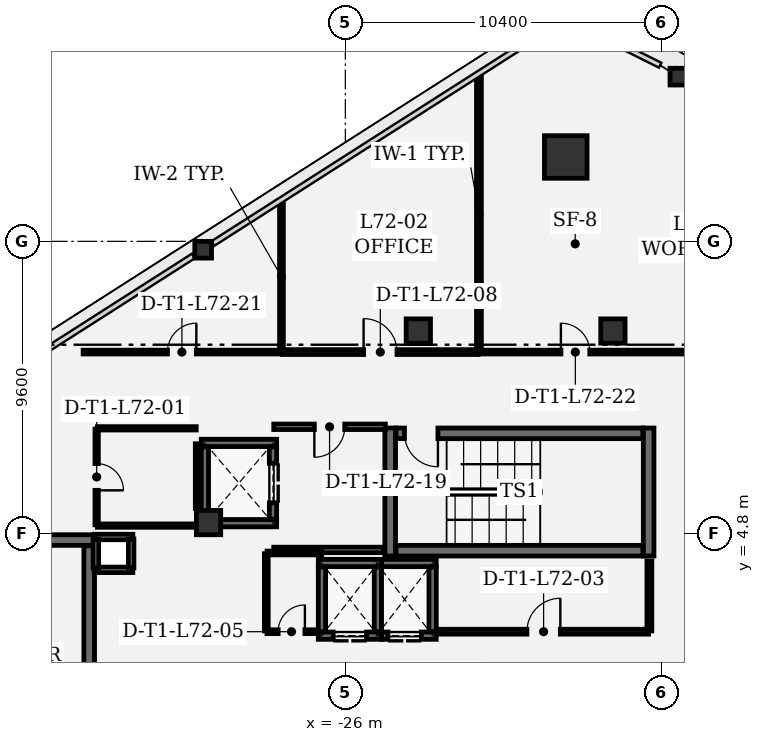
"""IFC4 building model, lengths in metres.
Left out: names, types, materials, properties, quantities, classifications, styles, units other than length and angle.
Written with IfcOpenShell. Run it as: python <this file> out.ifc"""

import sys

from ifc_helpers import new_model, si_unit, direction, frame, frame_2d, origin, origin_2d, place, context, subcontext, project, spatial, rectangle, extrude, element, fill, save


model = new_model("IFC4")
c1 = context("Model", 3, precision=1e-05, world=origin(), true_north=direction((0.0, 1.0)))
c2 = subcontext(c1, "Body", "Model", "MODEL_VIEW")
j1 = project(units=[si_unit("LENGTHUNIT", "METRE"), si_unit("PLANEANGLEUNIT", "RADIAN")], contexts=[c1])
p1 = place(None, origin())
s1 = spatial("IfcSite", under=j1, at=p1, CompositionType="ELEMENT")
p2 = place(p1, origin())
s2 = spatial("IfcBuilding", under=s1, at=p2, CompositionType="ELEMENT")
p3 = place(p2, frame((0.0, 0.0, 310.2)))
s3 = spatial("IfcBuildingStorey", under=s2, at=p3, CompositionType="ELEMENT", Elevation=310.2)
p4 = place(p3, frame((-18.75, 17.176, 0.0), z_axis=(0.0, 0.0, 1.0), x_axis=(1.0, 0.0, 0.0)))
e1 = element("IfcColumn", 1, at=p4, inside=s3, PredefinedType="COLUMN", context=c2, shape_type="SweptSolid", body=[
    extrude(rectangle(XDim=1.4, YDim=1.4, at=origin_2d()), origin(), (0.0, 0.0, 1.0), 4.2),
])
for number, where, z_axis, x_axis in (
    (2, (-23.6, 11.45, 0.0), (0.0, 0.0, 1.0), (1.0, 0.0, 0.0)),
    (3, (-17.2, 11.45, 0.0), (0.0, 0.0, 1.0), (1.0, 0.0, 0.0)),
    (4, (-30.5, 5.15, 0.0), (0.0, 0.0, 1.0), (1.0, 0.0, 0.0)),
):
    element("IfcColumn", number, at=place(p3, frame(where, z_axis=z_axis, x_axis=x_axis)), inside=s3, PredefinedType="COLUMN", context=c2, shape_type="SweptSolid", body=[
        extrude(rectangle(XDim=0.8, YDim=0.8, at=origin_2d()), origin(), (0.0, 0.0, 1.0), 4.2),
    ])
for number, where, z_axis, x_axis in (
    (5, (-30.677, 14.124, 0.0), (0.0, 0.0, 1.0), (1.0, 0.0, 0.0)),
    (6, (-15.046, 19.818, 0.0), (0.0, 0.0, 1.0), (1.0, 0.0, 0.0)),
):
    element("IfcColumn", number, at=place(p3, frame(where, z_axis=z_axis, x_axis=x_axis)), inside=s3, PredefinedType="COLUMN", context=c2, shape_type="SweptSolid", body=[
        extrude(rectangle(XDim=0.55, YDim=0.55, at=origin_2d()), origin(), (0.0, 0.0, 1.0), 4.2),
    ])
for number, where, z_axis, x_axis in (
    (7, (-24.525, 8.26, 0.0), (0.0, 0.0, 1.0), (0.0, -1.0, 0.0)),
    (8, (-16.025, 4.05, 0.0), (0.0, 0.0, 1.0), (0.0, 1.0, 0.0)),
):
    element("IfcWall", number, at=place(p3, frame(where, z_axis=z_axis, x_axis=x_axis)), inside=s3, PredefinedType="SHEAR", context=c2, shape_type="SweptSolid", body=[
        extrude(rectangle(XDim=4.21, YDim=0.35, at=frame_2d((2.105, 0.0))), origin(), (0.0, 0.0, 1.0), 3.91),
    ])
p5 = place(p3, frame((-24.335, 4.225, 0.0), z_axis=(0.0, 0.0, 1.0), x_axis=(1.0, 0.0, 0.0)))
e9 = element("IfcWall", 9, at=p5, inside=s3, PredefinedType="SHEAR", context=c2, shape_type="SweptSolid", body=[
    extrude(rectangle(XDim=8.12, YDim=0.35, at=frame_2d((4.06, 0.0))), origin(), (0.0, 0.0, 1.0), 3.91),
])
p6 = place(p3, frame((-16.215, 8.085, 0.0), z_axis=(0.0, 0.0, 1.0), x_axis=(-1.0, 0.0, 0.0)))
e10 = element("IfcWall", 10, at=p6, inside=s3, PredefinedType="SHEAR", context=c2, shape_type="SweptSolid", body=[
    extrude(rectangle(XDim=8.12, YDim=0.35, at=frame_2d((4.06, 0.0))), origin(), (0.0, 0.0, 1.0), 3.91),
])
p7 = place(p6, frame((6.74, 0.0, 0.0)))
e11 = element("IfcOpeningElement", 11, at=p7, cuts=e10, PredefinedType="OPENING", context=c2, shape_type="SweptSolid", body=[
    extrude(rectangle(XDim=1.1, YDim=2.2, at=frame_2d((0.55, 1.1))), frame((0.0, 0.185, 0.0), z_axis=(0.0, -1.0, 0.0), x_axis=(1.0, 0.0, 0.0)), (0.0, 0.0, 1.0), 0.37),
])
p8 = place(p3, frame((-34.25, 4.575, 0.0), z_axis=(0.0, 0.0, 1.0), x_axis=(-1.0, 0.0, 0.0)))
e12 = element("IfcWall", 12, at=p8, inside=s3, PredefinedType="SHEAR", context=c2, shape_type="SweptSolid", body=[
    extrude(rectangle(XDim=4.21, YDim=0.35, at=frame_2d((2.105, 0.0))), origin(), (0.0, 0.0, 1.0), 3.91),
])
p9 = place(p3, frame((-34.425, -4.385, 0.0), z_axis=(0.0, 0.0, 1.0), x_axis=(0.0, 1.0, 0.0)))
e13 = element("IfcWall", 13, at=p9, inside=s3, PredefinedType="SHEAR", context=c2, shape_type="SweptSolid", body=[
    extrude(rectangle(XDim=8.77, YDim=0.35, at=frame_2d((4.385, 0.0))), origin(), (0.0, 0.0, 1.0), 3.91),
])
for number, where, z_axis, x_axis in (
    (14, (-28.26, 5.13, 0.0), (0.0, 0.0, 1.0), (-1.0, 0.0, 0.0)),
    (15, (-30.74, 7.77, 0.0), (0.0, 0.0, 1.0), (1.0, 0.0, 0.0)),
):
    element("IfcWall", number, at=place(p3, frame(where, z_axis=z_axis, x_axis=x_axis)), inside=s3, PredefinedType="SHEAR", context=c2, shape_type="SweptSolid", body=[
        extrude(rectangle(XDim=2.48, YDim=0.24, at=frame_2d((1.24, 0.0))), origin(), (0.0, 0.0, 1.0), 3.91),
    ])
p10 = place(p3, frame((-30.62, 5.262, 0.0), z_axis=(0.0, 0.0, 1.0), x_axis=(0.0, 1.0, 0.0)))
e16 = element("IfcWall", 16, at=p10, inside=s3, PredefinedType="SHEAR", context=c2, shape_type="SweptSolid", body=[
    extrude(rectangle(XDim=2.376, YDim=0.24, at=frame_2d((1.188, 0.0))), origin(), (0.0, 0.0, 1.0), 3.91),
])
p11 = place(p3, frame((-28.38, 7.638, 0.0), z_axis=(0.0, 0.0, 1.0), x_axis=(0.0, -1.0, 0.0)))
e17 = element("IfcWall", 17, at=p11, inside=s3, PredefinedType="SHEAR", context=c2, shape_type="SweptSolid", body=[
    extrude(rectangle(XDim=2.376, YDim=0.24, at=frame_2d((1.188, 0.0))), origin(), (0.0, 0.0, 1.0), 3.91),
])
p12 = place(p11, frame((0.538, 0.0, 0.0)))
e18 = element("IfcOpeningElement", 18, at=p12, cuts=e17, PredefinedType="OPENING", context=c2, shape_type="SweptSolid", body=[
    extrude(rectangle(XDim=1.3, YDim=2.3, at=frame_2d((0.65, 1.15))), frame((0.0, 0.13, 0.0), z_axis=(0.0, -1.0, 0.0), x_axis=(1.0, 0.0, 0.0)), (0.0, 0.0, 1.0), 0.26),
])
p13 = place(p3, frame((-24.81, 1.43, 0.0), z_axis=(0.0, 0.0, 1.0), x_axis=(-1.0, 0.0, 0.0)))
e19 = element("IfcWall", 19, at=p13, inside=s3, PredefinedType="SHEAR", context=c2, shape_type="SweptSolid", body=[
    extrude(rectangle(XDim=2.08, YDim=0.24, at=frame_2d((1.04, 0.0))), origin(), (0.0, 0.0, 1.0), 3.91),
])
p14 = place(p13, frame((0.49, 0.0, 0.0)))
e20 = element("IfcOpeningElement", 20, at=p14, cuts=e19, PredefinedType="OPENING", context=c2, shape_type="SweptSolid", body=[
    extrude(rectangle(XDim=1.1, YDim=2.2, at=frame_2d((0.55, 1.1))), frame((0.0, 0.13, 0.0), z_axis=(0.0, -1.0, 0.0), x_axis=(1.0, 0.0, 0.0)), (0.0, 0.0, 1.0), 0.26),
])
p15 = place(p3, frame((-26.89, 3.82, 0.0), z_axis=(0.0, 0.0, 1.0), x_axis=(1.0, 0.0, 0.0)))
e21 = element("IfcWall", 21, at=p15, inside=s3, PredefinedType="SHEAR", context=c2, shape_type="SweptSolid", body=[
    extrude(rectangle(XDim=2.08, YDim=0.24, at=frame_2d((1.04, 0.0))), origin(), (0.0, 0.0, 1.0), 3.91),
])
for number, where, z_axis, x_axis in (
    (22, (-26.77, 1.562, 0.0), (0.0, 0.0, 1.0), (0.0, 1.0, 0.0)),
    (23, (-24.93, 3.688, 0.0), (0.0, 0.0, 1.0), (0.0, -1.0, 0.0)),
):
    element("IfcWall", number, at=place(p3, frame(where, z_axis=z_axis, x_axis=x_axis)), inside=s3, PredefinedType="SHEAR", context=c2, shape_type="SweptSolid", body=[
        extrude(rectangle(XDim=2.126, YDim=0.24, at=frame_2d((1.063, 0.0))), origin(), (0.0, 0.0, 1.0), 3.91),
    ])
p16 = place(p3, frame((-23.01, 1.43, 0.0), z_axis=(0.0, 0.0, 1.0), x_axis=(-1.0, 0.0, 0.0)))
e24 = element("IfcWall", 24, at=p16, inside=s3, PredefinedType="SHEAR", context=c2, shape_type="SweptSolid", body=[
    extrude(rectangle(XDim=1.8, YDim=0.24, at=frame_2d((0.9, 0.0))), origin(), (0.0, 0.0, 1.0), 3.91),
])
p17 = place(p16, frame((0.49, 0.0, 0.0)))
e25 = element("IfcOpeningElement", 25, at=p17, cuts=e24, PredefinedType="OPENING", context=c2, shape_type="SweptSolid", body=[
    extrude(rectangle(XDim=1.1, YDim=2.2, at=frame_2d((0.55, 1.1))), frame((0.0, 0.13, 0.0), z_axis=(0.0, -1.0, 0.0), x_axis=(1.0, 0.0, 0.0)), (0.0, 0.0, 1.0), 0.26),
])
p18 = place(p3, frame((-24.81, 3.82, 0.0), z_axis=(0.0, 0.0, 1.0), x_axis=(1.0, 0.0, 0.0)))
e26 = element("IfcWall", 26, at=p18, inside=s3, PredefinedType="SHEAR", context=c2, shape_type="SweptSolid", body=[
    extrude(rectangle(XDim=1.8, YDim=0.24, at=frame_2d((0.9, 0.0))), origin(), (0.0, 0.0, 1.0), 3.91),
])
p19 = place(p3, frame((-23.13, 3.688, 0.0), z_axis=(0.0, 0.0, 1.0), x_axis=(0.0, -1.0, 0.0)))
e27 = element("IfcWall", 27, at=p19, inside=s3, PredefinedType="SHEAR", context=c2, shape_type="SweptSolid", body=[
    extrude(rectangle(XDim=2.126, YDim=0.24, at=frame_2d((1.063, 0.0))), origin(), (0.0, 0.0, 1.0), 3.91),
])
for number, where, z_axis, x_axis in (
    (28, (-32.99, 3.595, 0.0), (0.0, 0.0, 1.0), (-1.0, 0.0, 0.0)),
    (29, (-34.26, 4.675, 0.0), (0.0, 0.0, 1.0), (1.0, 0.0, 0.0)),
):
    element("IfcWall", number, at=place(p3, frame(where, z_axis=z_axis, x_axis=x_axis)), inside=s3, PredefinedType="PARTITIONING", context=c2, shape_type="SweptSolid", body=[
        extrude(rectangle(XDim=1.27, YDim=0.18, at=frame_2d((0.635, 0.0))), origin(), (0.0, 0.0, 1.0), 3.91),
    ])
for number, where, z_axis, x_axis in (
    (30, (-34.205, 3.66, 0.0), (0.0, 0.0, 1.0), (0.0, 1.0, 0.0)),
    (31, (-33.045, 4.61, 0.0), (0.0, 0.0, 1.0), (0.0, -1.0, 0.0)),
):
    element("IfcWall", number, at=place(p3, frame(where, z_axis=z_axis, x_axis=x_axis)), inside=s3, PredefinedType="PARTITIONING", context=c2, shape_type="SweptSolid", body=[
        extrude(rectangle(XDim=0.95, YDim=0.18, at=frame_2d((0.475, 0.0))), origin(), (0.0, 0.0, 1.0), 3.91),
    ])
p20 = place(p3, frame((-28.355, 4.25, 0.0), z_axis=(0.0, 0.0, 1.0), x_axis=(1.0, 0.0, 0.0)))
e32 = element("IfcWall", 32, at=p20, inside=s3, PredefinedType="PARTITIONING", context=c2, shape_type="SweptSolid", body=[
    extrude(rectangle(XDim=3.622, YDim=0.18, at=frame_2d((1.811, 0.0))), origin(), (0.0, 0.0, 1.0), 3.91),
])
p21 = place(p3, frame((-24.684, 8.3, 0.0), z_axis=(0.0, 0.0, 1.0), x_axis=(-1.0, 0.0, 0.0)))
e33 = element("IfcWall", 33, at=p21, inside=s3, PredefinedType="PARTITIONING", context=c2, shape_type="SweptSolid", body=[
    extrude(rectangle(XDim=3.671, YDim=0.18, at=frame_2d((1.835, 0.0))), origin(), (0.0, 0.0, 1.0), 3.529),
])
p22 = place(p21, frame((1.335, 0.0, 0.0)))
e34 = element("IfcOpeningElement", 34, at=p22, cuts=e33, PredefinedType="OPENING", context=c2, shape_type="SweptSolid", body=[
    extrude(rectangle(XDim=1.0, YDim=2.15, at=frame_2d((0.5, 1.075))), frame((0.0, 0.1, 0.0), z_axis=(0.0, -1.0, 0.0), x_axis=(1.0, 0.0, 0.0)), (0.0, 0.0, 1.0), 0.2),
])
p23 = place(p3, frame((-34.18, 8.225, 0.0), z_axis=(0.0, 0.0, 1.0), x_axis=(0.0, -1.0, 0.0)))
e35 = element("IfcWall", 35, at=p23, inside=s3, PredefinedType="PARTITIONING", context=c2, shape_type="SweptSolid", body=[
    extrude(rectangle(XDim=3.15, YDim=0.11, at=frame_2d((1.575, 0.0))), origin(), (0.0, 0.0, 1.0), 3.91),
])
p24 = place(p23, frame((1.135, 0.0, 0.0)))
e36 = element("IfcOpeningElement", 36, at=p24, cuts=e35, PredefinedType="OPENING", context=c2, shape_type="SweptSolid", body=[
    extrude(rectangle(XDim=0.88, YDim=2.1, at=frame_2d((0.44, 1.05))), frame((0.0, 0.065, 0.0), z_axis=(0.0, -1.0, 0.0), x_axis=(1.0, 0.0, 0.0)), (0.0, 0.0, 1.0), 0.13),
])
p25 = place(p3, frame((-34.155, 5.05, 0.0), z_axis=(0.0, 0.0, 1.0), x_axis=(1.0, 0.0, 0.0)))
e37 = element("IfcWall", 37, at=p25, inside=s3, PredefinedType="PARTITIONING", context=c2, shape_type="SweptSolid", body=[
    extrude(rectangle(XDim=3.19, YDim=0.11, at=frame_2d((1.595, 0.0))), origin(), (0.0, 0.0, 1.0), 3.91),
])
p26 = place(p3, frame((-30.88, 5.615, 0.0), z_axis=(0.0, 0.0, 1.0), x_axis=(0.0, 1.0, 0.0)))
e38 = element("IfcWall", 38, at=p26, inside=s3, PredefinedType="PARTITIONING", context=c2, shape_type="SweptSolid", body=[
    extrude(rectangle(XDim=2.128, YDim=0.11, at=frame_2d((1.064, 0.0))), origin(), (0.0, 0.0, 1.0), 3.91),
])
p27 = place(p3, frame((-30.905, 8.25, 0.0), z_axis=(0.0, 0.0, 1.0), x_axis=(-1.0, 0.0, 0.0)))
e39 = element("IfcWall", 39, at=p27, inside=s3, PredefinedType="PARTITIONING", context=c2, shape_type="SweptSolid", body=[
    extrude(rectangle(XDim=3.25, YDim=0.11, at=frame_2d((1.625, 0.0))), origin(), (0.0, 0.0, 1.0), 3.13),
])
p28 = place(p3, frame((-22.934, 1.56, 0.0), z_axis=(0.0, 0.0, 1.0), x_axis=(1.0, 0.0, 0.0)))
e40 = element("IfcWall", 40, at=p28, inside=s3, PredefinedType="PARTITIONING", context=c2, shape_type="SweptSolid", body=[
    extrude(rectangle(XDim=6.909, YDim=0.16, at=frame_2d((3.455, 0.0))), origin(), (0.0, 0.0, 1.0), 3.91),
])
p29 = place(p28, frame((2.905, 0.0, 0.0)))
e41 = element("IfcOpeningElement", 41, at=p29, cuts=e40, PredefinedType="OPENING", context=c2, shape_type="SweptSolid", body=[
    extrude(rectangle(XDim=1.1, YDim=2.15, at=frame_2d((0.55, 1.075))), frame((0.0, 0.09, 0.0), z_axis=(0.0, -1.0, 0.0), x_axis=(1.0, 0.0, 0.0)), (0.0, 0.0, 1.0), 0.18),
])
p30 = place(p3, frame((-16.0, 1.585, 0.0), z_axis=(0.0, 0.0, 1.0), x_axis=(0.0, 1.0, 0.0)))
e42 = element("IfcWall", 42, at=p30, inside=s3, PredefinedType="PARTITIONING", context=c2, shape_type="SweptSolid", body=[
    extrude(rectangle(XDim=2.302, YDim=0.16, at=frame_2d((1.151, 0.0))), origin(), (0.0, 0.0, 1.0), 3.91),
])
p31 = place(p3, frame((-28.6, 4.125, 0.0), z_axis=(0.0, 0.0, 1.0), x_axis=(0.0, -1.0, 0.0)))
e43 = element("IfcWall", 43, at=p31, inside=s3, PredefinedType="PARTITIONING", context=c2, shape_type="SweptSolid", body=[
    extrude(rectangle(XDim=2.54, YDim=0.125, at=frame_2d((1.27, 0.0))), origin(), (0.0, 0.0, 1.0), 3.91),
])
p32 = place(p3, frame((-28.575, 1.56, 0.0), z_axis=(0.0, 0.0, 1.0), x_axis=(1.0, 0.0, 0.0)))
e44 = element("IfcWall", 44, at=p32, inside=s3, PredefinedType="PARTITIONING", context=c2, shape_type="SweptSolid", body=[
    extrude(rectangle(XDim=1.609, YDim=0.125, at=frame_2d((0.805, 0.0))), origin(), (0.0, 0.0, 1.0), 3.91),
])
p33 = place(p32, frame((0.365, 0.0, 0.0)))
e45 = element("IfcOpeningElement", 45, at=p33, cuts=e44, PredefinedType="OPENING", context=c2, shape_type="SweptSolid", body=[
    extrude(rectangle(XDim=0.88, YDim=2.1, at=frame_2d((0.44, 1.05))), frame((0.0, 0.073, 0.0), z_axis=(0.0, -1.0, 0.0), x_axis=(1.0, 0.0, 0.0)), (0.0, 0.0, 1.0), 0.145),
])
p34 = place(p3, frame((-26.775, 4.15, 0.0), z_axis=(0.0, 0.0, 1.0), x_axis=(-1.0, 0.0, 0.0)))
e46 = element("IfcWall", 46, at=p34, inside=s3, PredefinedType="PARTITIONING", context=c2, shape_type="SweptSolid", body=[
    extrude(rectangle(XDim=1.8, YDim=0.125, at=frame_2d((0.9, 0.0))), origin(), (0.0, 0.0, 1.0), 3.91),
])
p35 = place(p3, frame((-34.625, 10.758, 0.0), z_axis=(0.0, 0.0, 1.0), x_axis=(1.0, 0.0, 0.0)))
e47 = element("IfcWall", 47, at=p35, inside=s3, PredefinedType="PARTITIONING", context=c2, shape_type="SweptSolid", body=[
    extrude(rectangle(XDim=6.498, YDim=0.125, at=frame_2d((3.249, 0.0))), origin(), (0.0, 0.0, 1.0), 3.13),
])
p36 = place(p35, frame((2.774, 0.0, 0.0)))
e48 = element("IfcOpeningElement", 48, at=p36, cuts=e47, PredefinedType="OPENING", context=c2, shape_type="SweptSolid", body=[
    extrude(rectangle(XDim=0.95, YDim=2.15, at=frame_2d((0.475, 1.075))), frame((0.0, 0.073, 0.0), z_axis=(0.0, -1.0, 0.0), x_axis=(1.0, 0.0, 0.0)), (0.0, 0.0, 1.0), 0.145),
])
p37 = place(p3, frame((-28.102, 10.783, 0.0), z_axis=(0.0, 0.0, 1.0), x_axis=(0.0, 1.0, 0.0)))
e49 = element("IfcWall", 49, at=p37, inside=s3, PredefinedType="PARTITIONING", context=c2, shape_type="SweptSolid", body=[
    extrude(rectangle(XDim=4.907, YDim=0.125, at=frame_2d((2.454, 0.0))), origin(), (0.0, 0.0, 1.0), 3.91),
])
p38 = place(p3, frame((-28.069, 10.758, 0.0), z_axis=(0.0, 0.0, 1.0), x_axis=(1.0, 0.0, 0.0)))
e50 = element("IfcWall", 50, at=p38, inside=s3, PredefinedType="PARTITIONING", context=c2, shape_type="SweptSolid", body=[
    extrude(rectangle(XDim=6.438, YDim=0.16, at=frame_2d((3.219, 0.0))), origin(), (0.0, 0.0, 1.0), 3.91),
])
p39 = place(p38, frame((2.669, 0.0, 0.0)))
e51 = element("IfcOpeningElement", 51, at=p39, cuts=e50, PredefinedType="OPENING", context=c2, shape_type="SweptSolid", body=[
    extrude(rectangle(XDim=1.1, YDim=2.15, at=frame_2d((0.55, 1.075))), frame((0.0, 0.09, 0.0), z_axis=(0.0, -1.0, 0.0), x_axis=(1.0, 0.0, 0.0)), (0.0, 0.0, 1.0), 0.18),
])
p40 = place(p3, frame((-21.606, 10.783, 0.0), z_axis=(0.0, 0.0, 1.0), x_axis=(0.0, 1.0, 0.0)))
e52 = element("IfcWall", 52, at=p40, inside=s3, PredefinedType="PARTITIONING", context=c2, shape_type="SweptSolid", body=[
    extrude(rectangle(XDim=9.059, YDim=0.16, at=frame_2d((4.529, 0.0))), origin(), (0.0, 0.0, 1.0), 3.91),
])
p41 = place(p3, frame((-21.573, 10.758, 0.0), z_axis=(0.0, 0.0, 1.0), x_axis=(1.0, 0.0, 0.0)))
e53 = element("IfcWall", 53, at=p41, inside=s3, PredefinedType="PARTITIONING", context=c2, shape_type="SweptSolid", body=[
    extrude(rectangle(XDim=8.406, YDim=0.125, at=frame_2d((4.203, 0.0))), origin(), (0.0, 0.0, 1.0), 3.529),
])
p42 = place(p41, frame((2.663, 0.0, 0.0)))
e54 = element("IfcOpeningElement", 54, at=p42, cuts=e53, PredefinedType="OPENING", context=c2, shape_type="SweptSolid", body=[
    extrude(rectangle(XDim=0.95, YDim=2.15, at=frame_2d((0.475, 1.075))), frame((0.0, 0.073, 0.0), z_axis=(0.0, -1.0, 0.0), x_axis=(1.0, 0.0, 0.0)), (0.0, 0.0, 1.0), 0.145),
])
p43 = place(p7, origin())
e55 = element("IfcDoor", 55, at=p43, inside=s3, OperationType="SINGLE_SWING_LEFT", PredefinedType="DOOR", context=c2, shape_type="SweptSolid", body=[
    extrude(rectangle(XDim=1.1, YDim=2.2, at=frame_2d((0.55, 1.1))), frame((0.0, 0.025, 0.0), z_axis=(0.0, -1.0, 0.0), x_axis=(1.0, 0.0, 0.0)), (0.0, 0.0, 1.0), 0.05),
])
fill(e11, e55)
p44 = place(p12, origin())
e56 = element("IfcDoor", 56, at=p44, inside=s3, OperationType="DOUBLE_DOOR_SLIDING", PredefinedType="DOOR", context=c2, shape_type="SweptSolid", body=[
    extrude(rectangle(XDim=1.3, YDim=2.3, at=frame_2d((0.65, 1.15))), frame((0.0, 0.025, 0.0), z_axis=(0.0, -1.0, 0.0), x_axis=(1.0, 0.0, 0.0)), (0.0, 0.0, 1.0), 0.05),
])
fill(e18, e56)
p45 = place(p14, origin())
e57 = element("IfcDoor", 57, at=p45, inside=s3, OperationType="DOUBLE_DOOR_SLIDING", PredefinedType="DOOR", context=c2, shape_type="SweptSolid", body=[
    extrude(rectangle(XDim=1.1, YDim=2.2, at=frame_2d((0.55, 1.1))), frame((0.0, 0.025, 0.0), z_axis=(0.0, -1.0, 0.0), x_axis=(1.0, 0.0, 0.0)), (0.0, 0.0, 1.0), 0.05),
])
fill(e20, e57)
p46 = place(p17, origin())
e58 = element("IfcDoor", 58, at=p46, inside=s3, OperationType="DOUBLE_DOOR_SLIDING", PredefinedType="DOOR", context=c2, shape_type="SweptSolid", body=[
    extrude(rectangle(XDim=1.1, YDim=2.2, at=frame_2d((0.55, 1.1))), frame((0.0, 0.025, 0.0), z_axis=(0.0, -1.0, 0.0), x_axis=(1.0, 0.0, 0.0)), (0.0, 0.0, 1.0), 0.05),
])
fill(e25, e58)
p47 = place(p24, origin())
e59 = element("IfcDoor", 59, at=p47, inside=s3, OperationType="SINGLE_SWING_RIGHT", PredefinedType="DOOR", context=c2, shape_type="SweptSolid", body=[
    extrude(rectangle(XDim=0.88, YDim=2.1, at=frame_2d((0.44, 1.05))), frame((0.0, 0.025, 0.0), z_axis=(0.0, -1.0, 0.0), x_axis=(1.0, 0.0, 0.0)), (0.0, 0.0, 1.0), 0.05),
])
fill(e36, e59)
p48 = place(p29, origin())
e60 = element("IfcDoor", 60, at=p48, inside=s3, OperationType="SINGLE_SWING_RIGHT", PredefinedType="DOOR", context=c2, shape_type="SweptSolid", body=[
    extrude(rectangle(XDim=1.1, YDim=2.15, at=frame_2d((0.55, 1.075))), frame((0.0, 0.025, 0.0), z_axis=(0.0, -1.0, 0.0), x_axis=(1.0, 0.0, 0.0)), (0.0, 0.0, 1.0), 0.05),
])
fill(e41, e60)
p49 = place(p33, origin())
e61 = element("IfcDoor", 61, at=p49, inside=s3, OperationType="SINGLE_SWING_RIGHT", PredefinedType="DOOR", context=c2, shape_type="SweptSolid", body=[
    extrude(rectangle(XDim=0.88, YDim=2.1, at=frame_2d((0.44, 1.05))), frame((0.0, 0.025, 0.0), z_axis=(0.0, -1.0, 0.0), x_axis=(1.0, 0.0, 0.0)), (0.0, 0.0, 1.0), 0.05),
])
fill(e45, e61)
p50 = place(p39, origin())
e62 = element("IfcDoor", 62, at=p50, inside=s3, OperationType="SINGLE_SWING_LEFT", PredefinedType="DOOR", context=c2, shape_type="SweptSolid", body=[
    extrude(rectangle(XDim=1.1, YDim=2.15, at=frame_2d((0.55, 1.075))), frame((0.0, 0.025, 0.0), z_axis=(0.0, -1.0, 0.0), x_axis=(1.0, 0.0, 0.0)), (0.0, 0.0, 1.0), 0.05),
])
fill(e51, e62)
p51 = place(p22, origin())
e63 = element("IfcDoor", 63, at=p51, inside=s3, OperationType="SINGLE_SWING_RIGHT", PredefinedType="DOOR", context=c2, shape_type="SweptSolid", body=[
    extrude(rectangle(XDim=1.0, YDim=2.15, at=frame_2d((0.5, 1.075))), frame((0.0, 0.025, 0.0), z_axis=(0.0, -1.0, 0.0), x_axis=(1.0, 0.0, 0.0)), (0.0, 0.0, 1.0), 0.05),
])
fill(e34, e63)
p52 = place(p36, origin())
e64 = element("IfcDoor", 64, at=p52, inside=s3, OperationType="SINGLE_SWING_RIGHT", PredefinedType="DOOR", context=c2, shape_type="SweptSolid", body=[
    extrude(rectangle(XDim=0.95, YDim=2.15, at=frame_2d((0.475, 1.075))), frame((0.0, 0.025, 0.0), z_axis=(0.0, -1.0, 0.0), x_axis=(1.0, 0.0, 0.0)), (0.0, 0.0, 1.0), 0.05),
])
fill(e48, e64)
p53 = place(p42, origin())
e65 = element("IfcDoor", 65, at=p53, inside=s3, OperationType="SINGLE_SWING_LEFT", PredefinedType="DOOR", context=c2, shape_type="SweptSolid", body=[
    extrude(rectangle(XDim=0.95, YDim=2.15, at=frame_2d((0.475, 1.075))), frame((0.0, 0.025, 0.0), z_axis=(0.0, -1.0, 0.0), x_axis=(1.0, 0.0, 0.0)), (0.0, 0.0, 1.0), 0.05),
])
fill(e54, e65)
save(model, sys.argv[1])
